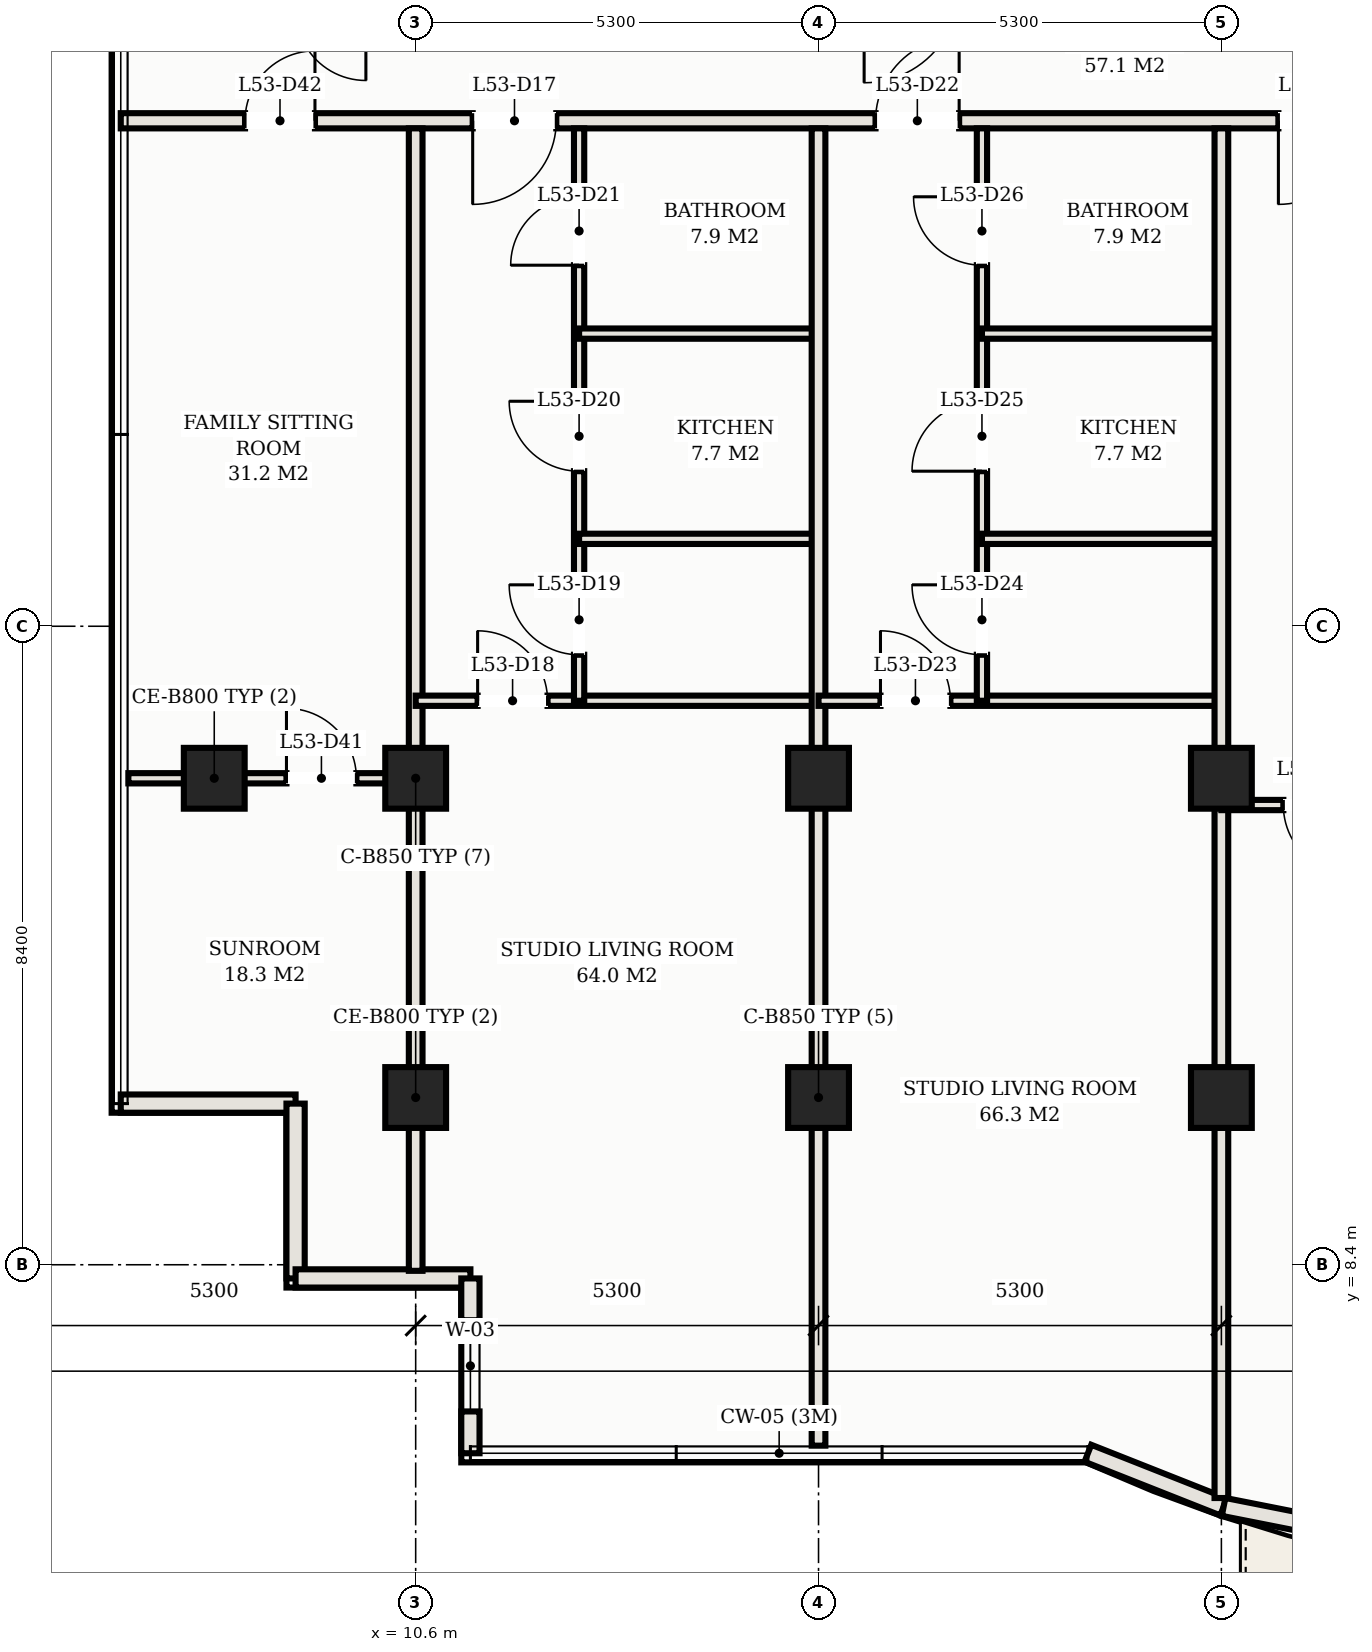
"""IFC4 building model, lengths in metres.
Left out: names, types, materials, properties, quantities, classifications, styles, units other than length and angle.
Written with IfcOpenShell. Run it as: python <this file> out.ifc"""

import sys

from ifc_helpers import new_model, si_unit, direction, frame, frame_2d, origin, origin_2d, place, context, subcontext, project, spatial, rectangle, hollow_rectangle, extrude, element, fill, save


model = new_model("IFC4")
c1 = context("Model", 3, precision=1e-05, world=origin(), true_north=direction((0.0, 1.0)))
c2 = subcontext(c1, "Body", "Model", "MODEL_VIEW")
j1 = project(units=[si_unit("LENGTHUNIT", "METRE"), si_unit("PLANEANGLEUNIT", "RADIAN")], contexts=[c1])
p1 = place(None, origin())
s1 = spatial("IfcSite", under=j1, at=p1, CompositionType="ELEMENT")
p2 = place(p1, origin())
s2 = spatial("IfcBuilding", under=s1, at=p2, CompositionType="ELEMENT")
p3 = place(p2, frame((0.0, 0.0, 196.7)))
s3 = spatial("IfcBuildingStorey", under=s2, at=p3, CompositionType="ELEMENT", Elevation=196.7)
for number, where, z_axis, x_axis in (
    (1, (10.6, 14.8, 0.0), (0.0, 0.0, 1.0), (1.0, 0.0, 0.0)),
    (2, (10.6, 10.6, 0.0), (0.0, 0.0, 1.0), (1.0, 0.0, 0.0)),
    (3, (15.9, 14.8, 0.0), (0.0, 0.0, 1.0), (1.0, 0.0, 0.0)),
    (4, (15.9, 10.6, 0.0), (0.0, 0.0, 1.0), (1.0, 0.0, 0.0)),
    (5, (21.2, 14.8, 0.0), (0.0, 0.0, 1.0), (1.0, 0.0, 0.0)),
    (6, (21.2, 10.6, 0.0), (0.0, 0.0, 1.0), (1.0, 0.0, 0.0)),
    (7, (7.95, 14.8, 0.0), (0.0, 0.0, 1.0), (1.0, 0.0, 0.0)),
):
    element("IfcColumn", number, at=place(p3, frame(where, z_axis=z_axis, x_axis=x_axis)), inside=s3, PredefinedType="COLUMN", context=c2, shape_type="SweptSolid", body=[
        extrude(hollow_rectangle(XDim=0.8, YDim=0.8, WallThickness=0.028, at=origin_2d()), origin(), (0.0, 0.0, 1.0), 3.3),
    ])
for number, where, z_axis, x_axis in (
    (8, (6.72, 10.52, 0.0), (0.0, 0.0, 1.0), (1.0, 0.0, 0.0)),
    (9, (9.02, 10.52, 0.0), (0.0, 0.0, 1.0), (0.0, -1.0, 0.0)),
    (10, (9.02, 8.22, 0.0), (0.0, 0.0, 1.0), (1.0, 0.0, 0.0)),
):
    element("IfcWall", number, at=place(p3, frame(where, z_axis=z_axis, x_axis=x_axis)), inside=s3, PredefinedType="SOLIDWALL", context=c2, shape_type="SweptSolid", body=[
        extrude(rectangle(XDim=2.3, YDim=0.24, at=frame_2d((1.15, 0.0))), origin(), (0.0, 0.0, 1.0), 3.11),
    ])
p4 = place(p3, frame((11.32, 8.22, 0.0), z_axis=(0.0, 0.0, 1.0), x_axis=(0.0, -1.0, 0.0)))
e11 = element("IfcWall", 11, at=p4, inside=s3, PredefinedType="SOLIDWALL", context=c2, shape_type="SweptSolid", body=[
    extrude(rectangle(XDim=2.3, YDim=0.24, at=frame_2d((1.15, 0.0))), origin(), (0.0, 0.0, 1.0), 3.11),
])
p5 = place(p4, frame((0.55, 0.0, 0.75)))
e12 = element("IfcOpeningElement", 12, at=p5, cuts=e11, PredefinedType="OPENING", context=c2, shape_type="SweptSolid", body=[
    extrude(rectangle(XDim=1.2, YDim=1.5, at=frame_2d((0.6, 0.75))), frame((0.0, 0.13, 0.0), z_axis=(0.0, -1.0, 0.0), x_axis=(1.0, 0.0, 0.0)), (0.0, 0.0, 1.0), 0.26),
])
p6 = place(p3, frame((19.444, 5.92, 0.0), z_axis=(0.0, 0.0, 1.0), x_axis=(0.92993442177, -0.367725401906, 0.0)))
e13 = element("IfcWall", 13, at=p6, inside=s3, PredefinedType="SOLIDWALL", context=c2, shape_type="SweptSolid", body=[
    extrude(rectangle(XDim=1.919, YDim=0.24, at=frame_2d((0.96, 0.0))), origin(), (0.0, 0.0, 1.0), 3.11),
])
p7 = place(p3, frame((21.229, 5.214, 0.0), z_axis=(0.0, 0.0, 1.0), x_axis=(0.980985349685, -0.194081796425, 0.0)))
e14 = element("IfcWall", 14, at=p7, inside=s3, PredefinedType="SOLIDWALL", context=c2, shape_type="SweptSolid", body=[
    extrude(rectangle(XDim=4.478, YDim=0.24, at=frame_2d((2.239, 0.0))), origin(), (0.0, 0.0, 1.0), 3.11),
])
p8 = place(p7, frame((1.381, 0.0, 0.0)))
e15 = element("IfcOpeningElement", 15, at=p8, cuts=e14, PredefinedType="OPENING", context=c2, shape_type="SweptSolid", body=[
    extrude(rectangle(XDim=1.8, YDim=2.2, at=frame_2d((0.9, 1.1))), frame((0.0, 0.13, 0.0), z_axis=(0.0, -1.0, 0.0), x_axis=(1.0, 0.0, 0.0)), (0.0, 0.0, 1.0), 0.26),
])
p9 = place(p3, frame((6.72, 23.45, 0.0), z_axis=(0.0, 0.0, 1.0), x_axis=(1.0, 0.0, 0.0)))
e16 = element("IfcWall", 16, at=p9, inside=s3, PredefinedType="PARTITIONING", context=c2, shape_type="SweptSolid", body=[
    extrude(rectangle(XDim=39.56, YDim=0.2, at=frame_2d((19.78, 0.0))), origin(), (0.0, 0.0, 1.0), 2.43),
])
p10 = place(p9, frame((4.63, 0.0, 0.0)))
e17 = element("IfcOpeningElement", 17, at=p10, cuts=e16, PredefinedType="OPENING", context=c2, shape_type="SweptSolid", body=[
    extrude(rectangle(XDim=1.1, YDim=2.25, at=frame_2d((0.55, 1.125))), frame((0.0, 0.11, 0.0), z_axis=(0.0, -1.0, 0.0), x_axis=(1.0, 0.0, 0.0)), (0.0, 0.0, 1.0), 0.22),
])
p11 = place(p9, frame((9.93, 0.0, 0.0)))
e18 = element("IfcOpeningElement", 18, at=p11, cuts=e16, PredefinedType="OPENING", context=c2, shape_type="SweptSolid", body=[
    extrude(rectangle(XDim=1.1, YDim=2.25, at=frame_2d((0.55, 1.125))), frame((0.0, 0.11, 0.0), z_axis=(0.0, -1.0, 0.0), x_axis=(1.0, 0.0, 0.0)), (0.0, 0.0, 1.0), 0.22),
])
p12 = place(p9, frame((15.23, 0.0, 0.0)))
e19 = element("IfcOpeningElement", 19, at=p12, cuts=e16, PredefinedType="OPENING", context=c2, shape_type="SweptSolid", body=[
    extrude(rectangle(XDim=1.1, YDim=2.25, at=frame_2d((0.55, 1.125))), frame((0.0, 0.11, 0.0), z_axis=(0.0, -1.0, 0.0), x_axis=(1.0, 0.0, 0.0)), (0.0, 0.0, 1.0), 0.22),
])
p13 = place(p9, frame((1.635, 0.0, 0.0)))
e20 = element("IfcOpeningElement", 20, at=p13, cuts=e16, PredefinedType="OPENING", context=c2, shape_type="SweptSolid", body=[
    extrude(rectangle(XDim=0.92, YDim=2.15, at=frame_2d((0.46, 1.075))), frame((0.0, 0.11, 0.0), z_axis=(0.0, -1.0, 0.0), x_axis=(1.0, 0.0, 0.0)), (0.0, 0.0, 1.0), 0.22),
])
p14 = place(p9, frame((37.005, 0.0, 0.0)))
e21 = element("IfcOpeningElement", 21, at=p14, cuts=e16, PredefinedType="OPENING", context=c2, shape_type="SweptSolid", body=[
    extrude(rectangle(XDim=0.92, YDim=2.15, at=frame_2d((0.46, 1.075))), frame((0.0, 0.11, 0.0), z_axis=(0.0, -1.0, 0.0), x_axis=(1.0, 0.0, 0.0)), (0.0, 0.0, 1.0), 0.22),
])
p15 = place(p3, frame((10.6, 8.32, 0.0), z_axis=(0.0, 0.0, 1.0), x_axis=(0.0, 1.0, 0.0)))
e22 = element("IfcWall", 22, at=p15, inside=s3, PredefinedType="PARTITIONING", context=c2, shape_type="SweptSolid", body=[
    extrude(rectangle(XDim=15.03, YDim=0.18, at=frame_2d((7.515, 0.0))), origin(), (0.0, 0.0, 1.0), 2.43),
])
p16 = place(p3, frame((10.6, 15.82, 0.0), z_axis=(0.0, 0.0, 1.0), x_axis=(1.0, 0.0, 0.0)))
e23 = element("IfcWall", 23, at=p16, inside=s3, PredefinedType="PARTITIONING", context=c2, shape_type="SweptSolid", body=[
    extrude(rectangle(XDim=5.3, YDim=0.135, at=frame_2d((2.65, 0.0))), origin(), (0.0, 0.0, 1.0), 2.43),
])
p17 = place(p16, frame((0.815, 0.0, 0.0)))
e24 = element("IfcOpeningElement", 24, at=p17, cuts=e23, PredefinedType="OPENING", context=c2, shape_type="SweptSolid", body=[
    extrude(rectangle(XDim=0.92, YDim=2.15, at=frame_2d((0.46, 1.075))), frame((0.0, 0.078, 0.0), z_axis=(0.0, -1.0, 0.0), x_axis=(1.0, 0.0, 0.0)), (0.0, 0.0, 1.0), 0.155),
])
p18 = place(p3, frame((12.75, 15.82, 0.0), z_axis=(0.0, 0.0, 1.0), x_axis=(0.0, 1.0, 0.0)))
e25 = element("IfcWall", 25, at=p18, inside=s3, PredefinedType="PARTITIONING", context=c2, shape_type="SweptSolid", body=[
    extrude(rectangle(XDim=7.53, YDim=0.135, at=frame_2d((3.765, 0.0))), origin(), (0.0, 0.0, 1.0), 2.43),
])
p19 = place(p18, frame((0.605, 0.0, 0.0)))
e26 = element("IfcOpeningElement", 26, at=p19, cuts=e25, PredefinedType="OPENING", context=c2, shape_type="SweptSolid", body=[
    extrude(rectangle(XDim=0.92, YDim=2.15, at=frame_2d((0.46, 1.075))), frame((0.0, 0.078, 0.0), z_axis=(0.0, -1.0, 0.0), x_axis=(1.0, 0.0, 0.0)), (0.0, 0.0, 1.0), 0.155),
])
p20 = place(p18, frame((3.02, 0.0, 0.0)))
e27 = element("IfcOpeningElement", 27, at=p20, cuts=e25, PredefinedType="OPENING", context=c2, shape_type="SweptSolid", body=[
    extrude(rectangle(XDim=0.92, YDim=2.15, at=frame_2d((0.46, 1.075))), frame((0.0, 0.078, 0.0), z_axis=(0.0, -1.0, 0.0), x_axis=(1.0, 0.0, 0.0)), (0.0, 0.0, 1.0), 0.155),
])
p21 = place(p18, frame((5.73, 0.0, 0.0)))
e28 = element("IfcOpeningElement", 28, at=p21, cuts=e25, PredefinedType="OPENING", context=c2, shape_type="SweptSolid", body=[
    extrude(rectangle(XDim=0.9, YDim=2.15, at=frame_2d((0.45, 1.075))), frame((0.0, 0.078, 0.0), z_axis=(0.0, -1.0, 0.0), x_axis=(1.0, 0.0, 0.0)), (0.0, 0.0, 1.0), 0.155),
])
for number, where, z_axis, x_axis in (
    (29, (12.75, 17.95, 0.0), (0.0, 0.0, 1.0), (1.0, 0.0, 0.0)),
    (30, (12.75, 20.65, 0.0), (0.0, 0.0, 1.0), (1.0, 0.0, 0.0)),
):
    element("IfcWall", number, at=place(p3, frame(where, z_axis=z_axis, x_axis=x_axis)), inside=s3, PredefinedType="PARTITIONING", context=c2, shape_type="SweptSolid", body=[
        extrude(rectangle(XDim=3.15, YDim=0.135, at=frame_2d((1.575, 0.0))), origin(), (0.0, 0.0, 1.0), 2.43),
    ])
p22 = place(p3, frame((15.9, 6.02, 0.0), z_axis=(0.0, 0.0, 1.0), x_axis=(0.0, 1.0, 0.0)))
e31 = element("IfcWall", 31, at=p22, inside=s3, PredefinedType="PARTITIONING", context=c2, shape_type="SweptSolid", body=[
    extrude(rectangle(XDim=17.33, YDim=0.18, at=frame_2d((8.665, 0.0))), origin(), (0.0, 0.0, 1.0), 2.43),
])
p23 = place(p3, frame((15.9, 15.82, 0.0), z_axis=(0.0, 0.0, 1.0), x_axis=(1.0, 0.0, 0.0)))
e32 = element("IfcWall", 32, at=p23, inside=s3, PredefinedType="PARTITIONING", context=c2, shape_type="SweptSolid", body=[
    extrude(rectangle(XDim=5.3, YDim=0.135, at=frame_2d((2.65, 0.0))), origin(), (0.0, 0.0, 1.0), 2.43),
])
p24 = place(p23, frame((0.815, 0.0, 0.0)))
e33 = element("IfcOpeningElement", 33, at=p24, cuts=e32, PredefinedType="OPENING", context=c2, shape_type="SweptSolid", body=[
    extrude(rectangle(XDim=0.92, YDim=2.15, at=frame_2d((0.46, 1.075))), frame((0.0, 0.078, 0.0), z_axis=(0.0, -1.0, 0.0), x_axis=(1.0, 0.0, 0.0)), (0.0, 0.0, 1.0), 0.155),
])
p25 = place(p3, frame((18.05, 15.82, 0.0), z_axis=(0.0, 0.0, 1.0), x_axis=(0.0, 1.0, 0.0)))
e34 = element("IfcWall", 34, at=p25, inside=s3, PredefinedType="PARTITIONING", context=c2, shape_type="SweptSolid", body=[
    extrude(rectangle(XDim=7.53, YDim=0.135, at=frame_2d((3.765, 0.0))), origin(), (0.0, 0.0, 1.0), 2.43),
])
p26 = place(p25, frame((0.605, 0.0, 0.0)))
e35 = element("IfcOpeningElement", 35, at=p26, cuts=e34, PredefinedType="OPENING", context=c2, shape_type="SweptSolid", body=[
    extrude(rectangle(XDim=0.92, YDim=2.15, at=frame_2d((0.46, 1.075))), frame((0.0, 0.078, 0.0), z_axis=(0.0, -1.0, 0.0), x_axis=(1.0, 0.0, 0.0)), (0.0, 0.0, 1.0), 0.155),
])
p27 = place(p25, frame((3.02, 0.0, 0.0)))
e36 = element("IfcOpeningElement", 36, at=p27, cuts=e34, PredefinedType="OPENING", context=c2, shape_type="SweptSolid", body=[
    extrude(rectangle(XDim=0.92, YDim=2.15, at=frame_2d((0.46, 1.075))), frame((0.0, 0.078, 0.0), z_axis=(0.0, -1.0, 0.0), x_axis=(1.0, 0.0, 0.0)), (0.0, 0.0, 1.0), 0.155),
])
p28 = place(p25, frame((5.73, 0.0, 0.0)))
e37 = element("IfcOpeningElement", 37, at=p28, cuts=e34, PredefinedType="OPENING", context=c2, shape_type="SweptSolid", body=[
    extrude(rectangle(XDim=0.9, YDim=2.15, at=frame_2d((0.45, 1.075))), frame((0.0, 0.078, 0.0), z_axis=(0.0, -1.0, 0.0), x_axis=(1.0, 0.0, 0.0)), (0.0, 0.0, 1.0), 0.155),
])
for number, where, z_axis, x_axis in (
    (38, (18.05, 17.95, 0.0), (0.0, 0.0, 1.0), (1.0, 0.0, 0.0)),
    (39, (18.05, 20.65, 0.0), (0.0, 0.0, 1.0), (1.0, 0.0, 0.0)),
):
    element("IfcWall", number, at=place(p3, frame(where, z_axis=z_axis, x_axis=x_axis)), inside=s3, PredefinedType="PARTITIONING", context=c2, shape_type="SweptSolid", body=[
        extrude(rectangle(XDim=3.15, YDim=0.135, at=frame_2d((1.575, 0.0))), origin(), (0.0, 0.0, 1.0), 2.43),
    ])
p29 = place(p3, frame((21.2, 5.331, 0.0), z_axis=(0.0, 0.0, 1.0), x_axis=(0.0, 1.0, 0.0)))
e40 = element("IfcWall", 40, at=p29, inside=s3, PredefinedType="PARTITIONING", context=c2, shape_type="SweptSolid", body=[
    extrude(rectangle(XDim=18.019, YDim=0.18, at=frame_2d((9.01, 0.0))), origin(), (0.0, 0.0, 1.0), 2.43),
])
p30 = place(p3, frame((21.2, 14.448, 0.0), z_axis=(0.0, 0.0, 1.0), x_axis=(1.0, 0.0, 0.0)))
e41 = element("IfcWall", 41, at=p30, inside=s3, PredefinedType="PARTITIONING", context=c2, shape_type="SweptSolid", body=[
    extrude(rectangle(XDim=5.3, YDim=0.135, at=frame_2d((2.65, 0.0))), origin(), (0.0, 0.0, 1.0), 2.43),
])
p31 = place(p30, frame((0.815, 0.0, 0.0)))
e42 = element("IfcOpeningElement", 42, at=p31, cuts=e41, PredefinedType="OPENING", context=c2, shape_type="SweptSolid", body=[
    extrude(rectangle(XDim=0.92, YDim=2.15, at=frame_2d((0.46, 1.075))), frame((0.0, 0.078, 0.0), z_axis=(0.0, -1.0, 0.0), x_axis=(1.0, 0.0, 0.0)), (0.0, 0.0, 1.0), 0.155),
])
p32 = place(p3, frame((6.82, 14.8, 0.0), z_axis=(0.0, 0.0, 1.0), x_axis=(1.0, 0.0, 0.0)))
e43 = element("IfcWall", 43, at=p32, inside=s3, PredefinedType="PARTITIONING", context=c2, shape_type="SweptSolid", body=[
    extrude(rectangle(XDim=3.78, YDim=0.135, at=frame_2d((1.89, 0.0))), origin(), (0.0, 0.0, 1.0), 2.43),
])
p33 = place(p32, frame((2.08, 0.0, 0.0)))
e44 = element("IfcOpeningElement", 44, at=p33, cuts=e43, PredefinedType="OPENING", context=c2, shape_type="SweptSolid", body=[
    extrude(rectangle(XDim=0.92, YDim=2.15, at=frame_2d((0.46, 1.075))), frame((0.0, 0.078, 0.0), z_axis=(0.0, -1.0, 0.0), x_axis=(1.0, 0.0, 0.0)), (0.0, 0.0, 1.0), 0.155),
])
p34 = place(p5, origin())
e45 = element("IfcWindow", 45, at=p34, inside=s3, PartitioningType="SINGLE_PANEL", PredefinedType="WINDOW", context=c2, shape_type="SweptSolid", body=[
    extrude(rectangle(XDim=1.2, YDim=1.5, at=frame_2d((0.6, 0.75))), frame((0.0, 0.03, 0.0), z_axis=(0.0, -1.0, 0.0), x_axis=(1.0, 0.0, 0.0)), (0.0, 0.0, 1.0), 0.06),
])
fill(e12, e45)
p35 = place(p10, frame((1.1, 0.0, 0.0), z_axis=(0.0, 0.0, 1.0), x_axis=(-1.0, 0.0, 0.0)))
e46 = element("IfcDoor", 46, at=p35, inside=s3, OperationType="SINGLE_SWING_RIGHT", PredefinedType="DOOR", context=c2, shape_type="SweptSolid", body=[
    extrude(rectangle(XDim=1.1, YDim=2.25, at=frame_2d((0.55, 1.125))), frame((0.0, 0.025, 0.0), z_axis=(0.0, -1.0, 0.0), x_axis=(1.0, 0.0, 0.0)), (0.0, 0.0, 1.0), 0.05),
])
fill(e17, e46)
p36 = place(p17, origin())
e47 = element("IfcDoor", 47, at=p36, inside=s3, OperationType="SINGLE_SWING_LEFT", PredefinedType="DOOR", context=c2, shape_type="SweptSolid", body=[
    extrude(rectangle(XDim=0.92, YDim=2.15, at=frame_2d((0.46, 1.075))), frame((0.0, 0.025, 0.0), z_axis=(0.0, -1.0, 0.0), x_axis=(1.0, 0.0, 0.0)), (0.0, 0.0, 1.0), 0.05),
])
fill(e24, e47)
p37 = place(p19, origin())
e48 = element("IfcDoor", 48, at=p37, inside=s3, OperationType="SINGLE_SWING_RIGHT", PredefinedType="DOOR", context=c2, shape_type="SweptSolid", body=[
    extrude(rectangle(XDim=0.92, YDim=2.15, at=frame_2d((0.46, 1.075))), frame((0.0, 0.025, 0.0), z_axis=(0.0, -1.0, 0.0), x_axis=(1.0, 0.0, 0.0)), (0.0, 0.0, 1.0), 0.05),
])
fill(e26, e48)
p38 = place(p20, origin())
e49 = element("IfcDoor", 49, at=p38, inside=s3, OperationType="SINGLE_SWING_RIGHT", PredefinedType="DOOR", context=c2, shape_type="SweptSolid", body=[
    extrude(rectangle(XDim=0.92, YDim=2.15, at=frame_2d((0.46, 1.075))), frame((0.0, 0.025, 0.0), z_axis=(0.0, -1.0, 0.0), x_axis=(1.0, 0.0, 0.0)), (0.0, 0.0, 1.0), 0.05),
])
fill(e27, e49)
p39 = place(p21, origin())
e50 = element("IfcDoor", 50, at=p39, inside=s3, OperationType="SINGLE_SWING_LEFT", PredefinedType="DOOR", context=c2, shape_type="SweptSolid", body=[
    extrude(rectangle(XDim=0.9, YDim=2.15, at=frame_2d((0.45, 1.075))), frame((0.0, 0.025, 0.0), z_axis=(0.0, -1.0, 0.0), x_axis=(1.0, 0.0, 0.0)), (0.0, 0.0, 1.0), 0.05),
])
fill(e28, e50)
p40 = place(p11, origin())
e51 = element("IfcDoor", 51, at=p40, inside=s3, OperationType="SINGLE_SWING_RIGHT", PredefinedType="DOOR", context=c2, shape_type="SweptSolid", body=[
    extrude(rectangle(XDim=1.1, YDim=2.25, at=frame_2d((0.55, 1.125))), frame((0.0, 0.025, 0.0), z_axis=(0.0, -1.0, 0.0), x_axis=(1.0, 0.0, 0.0)), (0.0, 0.0, 1.0), 0.05),
])
fill(e18, e51)
p41 = place(p24, origin())
e52 = element("IfcDoor", 52, at=p41, inside=s3, OperationType="SINGLE_SWING_LEFT", PredefinedType="DOOR", context=c2, shape_type="SweptSolid", body=[
    extrude(rectangle(XDim=0.92, YDim=2.15, at=frame_2d((0.46, 1.075))), frame((0.0, 0.025, 0.0), z_axis=(0.0, -1.0, 0.0), x_axis=(1.0, 0.0, 0.0)), (0.0, 0.0, 1.0), 0.05),
])
fill(e33, e52)
p42 = place(p26, origin())
e53 = element("IfcDoor", 53, at=p42, inside=s3, OperationType="SINGLE_SWING_RIGHT", PredefinedType="DOOR", context=c2, shape_type="SweptSolid", body=[
    extrude(rectangle(XDim=0.92, YDim=2.15, at=frame_2d((0.46, 1.075))), frame((0.0, 0.025, 0.0), z_axis=(0.0, -1.0, 0.0), x_axis=(1.0, 0.0, 0.0)), (0.0, 0.0, 1.0), 0.05),
])
fill(e35, e53)
p43 = place(p27, origin())
e54 = element("IfcDoor", 54, at=p43, inside=s3, OperationType="SINGLE_SWING_LEFT", PredefinedType="DOOR", context=c2, shape_type="SweptSolid", body=[
    extrude(rectangle(XDim=0.92, YDim=2.15, at=frame_2d((0.46, 1.075))), frame((0.0, 0.025, 0.0), z_axis=(0.0, -1.0, 0.0), x_axis=(1.0, 0.0, 0.0)), (0.0, 0.0, 1.0), 0.05),
])
fill(e36, e54)
p44 = place(p28, origin())
e55 = element("IfcDoor", 55, at=p44, inside=s3, OperationType="SINGLE_SWING_RIGHT", PredefinedType="DOOR", context=c2, shape_type="SweptSolid", body=[
    extrude(rectangle(XDim=0.9, YDim=2.15, at=frame_2d((0.45, 1.075))), frame((0.0, 0.025, 0.0), z_axis=(0.0, -1.0, 0.0), x_axis=(1.0, 0.0, 0.0)), (0.0, 0.0, 1.0), 0.05),
])
fill(e37, e55)
p45 = place(p12, frame((1.1, 0.0, 0.0), z_axis=(0.0, 0.0, 1.0), x_axis=(-1.0, 0.0, 0.0)))
e56 = element("IfcDoor", 56, at=p45, inside=s3, OperationType="SINGLE_SWING_RIGHT", PredefinedType="DOOR", context=c2, shape_type="SweptSolid", body=[
    extrude(rectangle(XDim=1.1, YDim=2.25, at=frame_2d((0.55, 1.125))), frame((0.0, 0.025, 0.0), z_axis=(0.0, -1.0, 0.0), x_axis=(1.0, 0.0, 0.0)), (0.0, 0.0, 1.0), 0.05),
])
fill(e19, e56)
p46 = place(p31, frame((0.92, 0.0, 0.0), z_axis=(0.0, 0.0, 1.0), x_axis=(-1.0, 0.0, 0.0)))
e57 = element("IfcDoor", 57, at=p46, inside=s3, OperationType="SINGLE_SWING_LEFT", PredefinedType="DOOR", context=c2, shape_type="SweptSolid", body=[
    extrude(rectangle(XDim=0.92, YDim=2.15, at=frame_2d((0.46, 1.075))), frame((0.0, 0.025, 0.0), z_axis=(0.0, -1.0, 0.0), x_axis=(1.0, 0.0, 0.0)), (0.0, 0.0, 1.0), 0.05),
])
fill(e42, e57)
p47 = place(p33, origin())
e58 = element("IfcDoor", 58, at=p47, inside=s3, OperationType="SINGLE_SWING_LEFT", PredefinedType="DOOR", context=c2, shape_type="SweptSolid", body=[
    extrude(rectangle(XDim=0.92, YDim=2.15, at=frame_2d((0.46, 1.075))), frame((0.0, 0.025, 0.0), z_axis=(0.0, -1.0, 0.0), x_axis=(1.0, 0.0, 0.0)), (0.0, 0.0, 1.0), 0.05),
])
fill(e44, e58)
p48 = place(p13, origin())
e59 = element("IfcDoor", 59, at=p48, inside=s3, OperationType="SINGLE_SWING_RIGHT", PredefinedType="DOOR", context=c2, shape_type="SweptSolid", body=[
    extrude(rectangle(XDim=0.92, YDim=2.15, at=frame_2d((0.46, 1.075))), frame((0.0, 0.025, 0.0), z_axis=(0.0, -1.0, 0.0), x_axis=(1.0, 0.0, 0.0)), (0.0, 0.0, 1.0), 0.05),
])
fill(e20, e59)
save(model, sys.argv[1])
